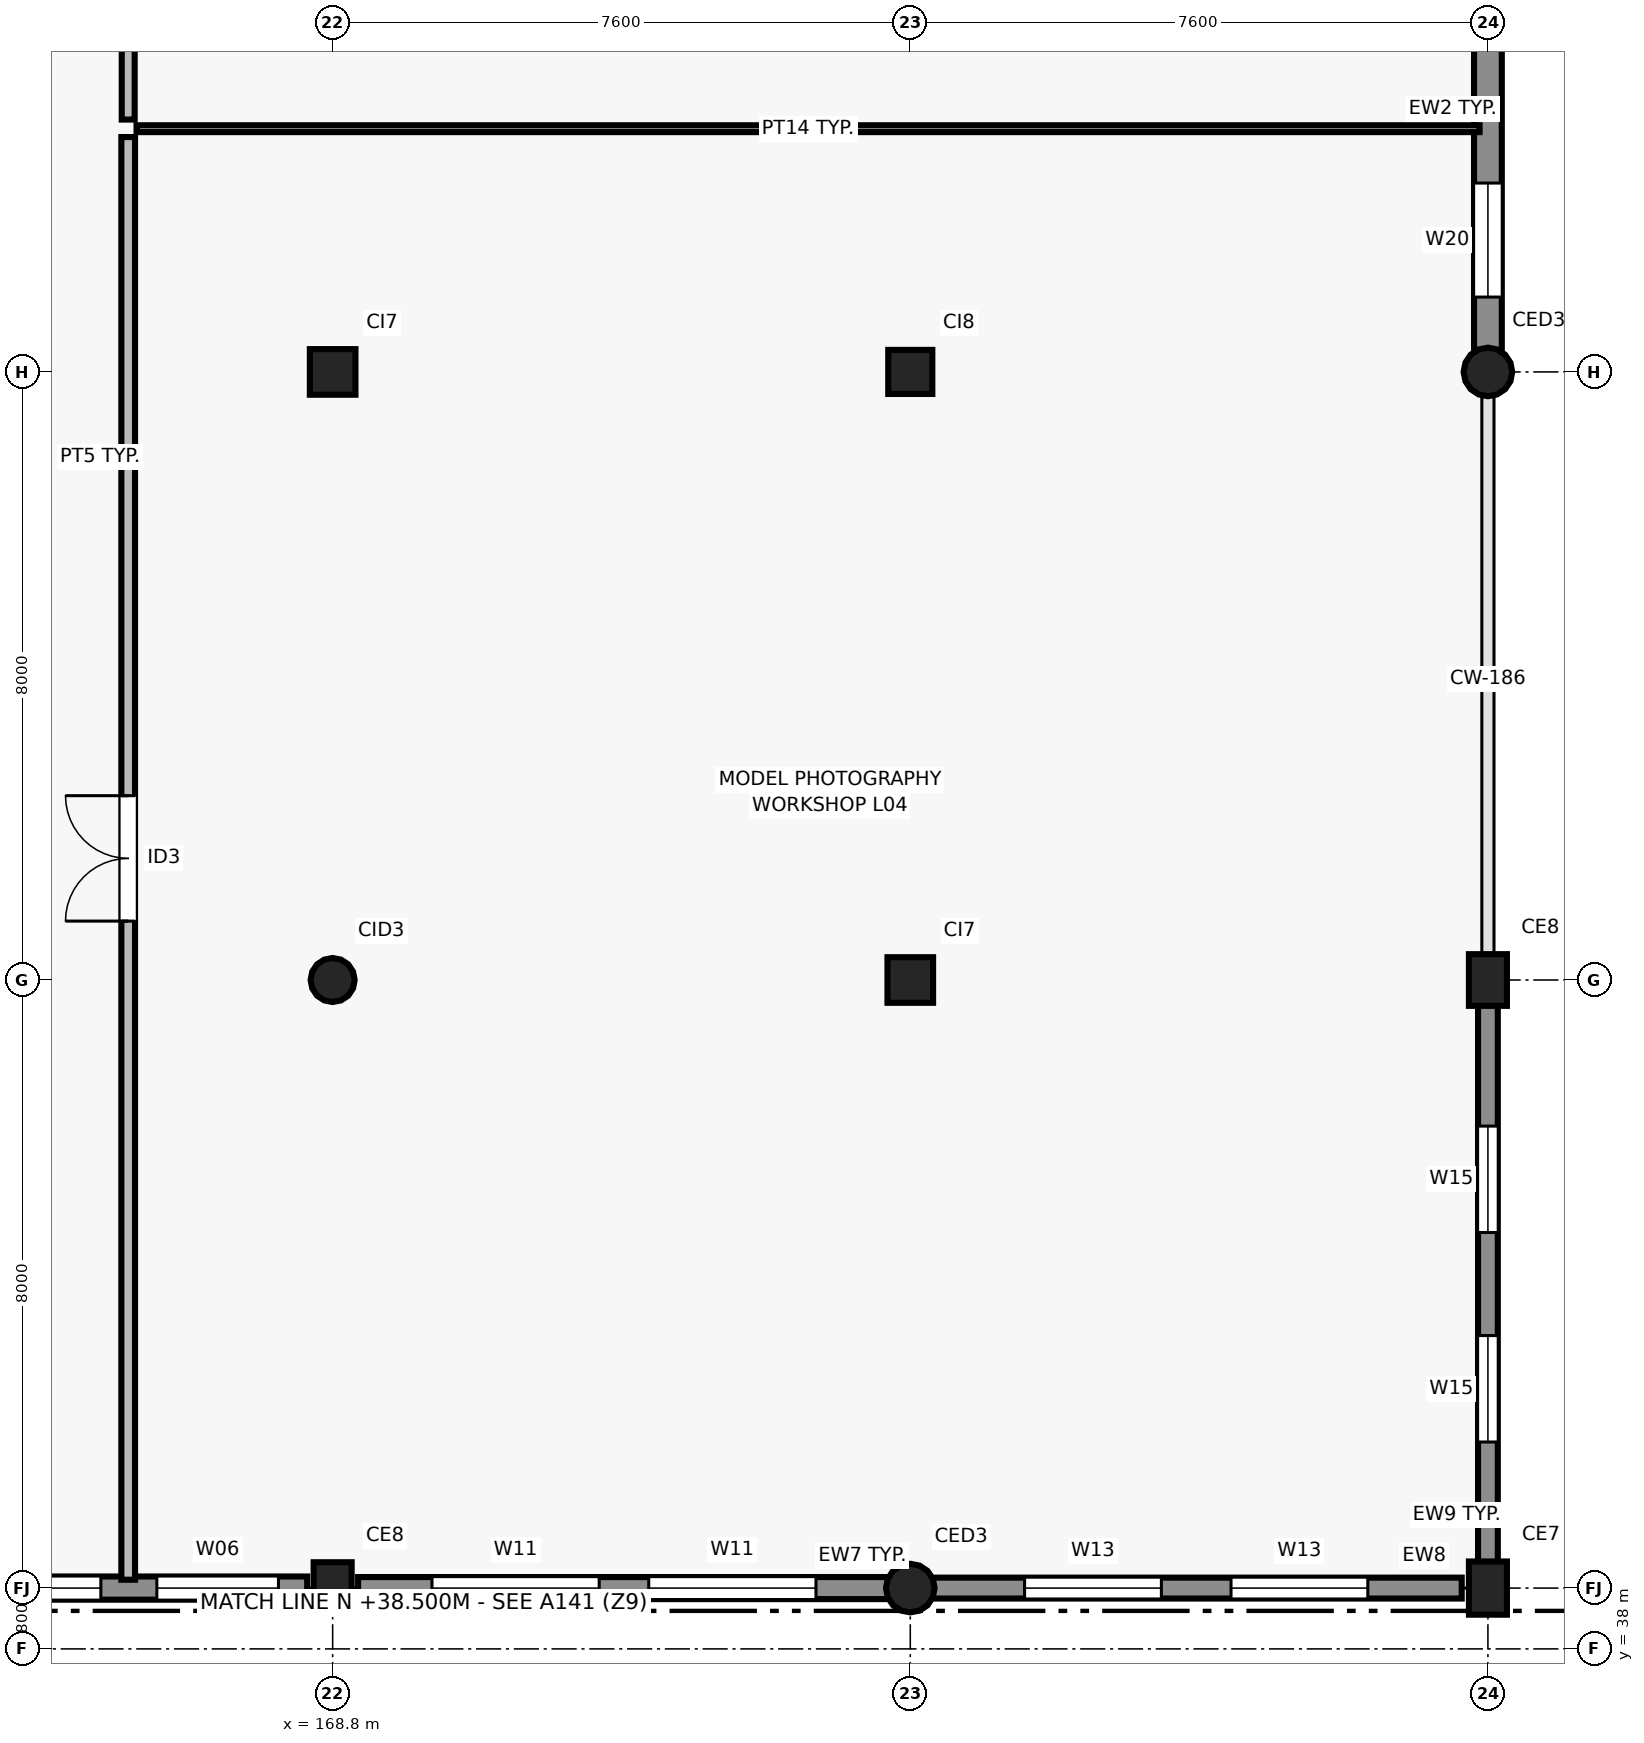
"""IFC4 building model, lengths in metres.
Left out: names, types, materials, properties, quantities, classifications, styles, units other than length and angle.
Written with IfcOpenShell. Run it as: python <this file> out.ifc"""

import sys

from ifc_helpers import new_model, si_unit, direction, frame, frame_2d, origin, origin_2d, place, context, subcontext, project, spatial, rectangle, circle, extrude, element, fill, save


model = new_model("IFC4")
c1 = context("Model", 3, precision=1e-05, world=origin(), true_north=direction((0.0, 1.0)))
c2 = subcontext(c1, "Body", "Model", "MODEL_VIEW")
j1 = project(units=[si_unit("LENGTHUNIT", "METRE"), si_unit("PLANEANGLEUNIT", "RADIAN")], contexts=[c1])
p1 = place(None, origin())
s1 = spatial("IfcSite", under=j1, at=p1, CompositionType="ELEMENT")
p2 = place(p1, origin())
s2 = spatial("IfcBuilding", under=s1, at=p2, CompositionType="ELEMENT")
p3 = place(p2, frame((0.0, 0.0, 17.4)))
s3 = spatial("IfcBuildingStorey", under=s2, at=p3, CompositionType="ELEMENT", Elevation=17.4)
p4 = place(p3, frame((168.8, 38.8, 0.0), z_axis=(0.0, 0.0, 1.0), x_axis=(1.0, 0.0, 0.0)))
e1 = element("IfcColumn", 1, at=p4, inside=s3, PredefinedType="COLUMN", context=c2, shape_type="SweptSolid", body=[
    extrude(rectangle(XDim=0.68, YDim=0.5, at=origin_2d()), origin(), (0.0, 0.0, 1.0), 4.2),
])
p5 = place(p3, frame((168.8, 46.8, 0.0), z_axis=(0.0, 0.0, 1.0), x_axis=(1.0, 0.0, 0.0)))
e2 = element("IfcColumn", 2, at=p5, inside=s3, PredefinedType="COLUMN", context=c2, shape_type="SweptSolid", body=[
    extrude(circle(Radius=0.29, at=origin_2d()), origin(), (0.0, 0.0, 1.0), 4.2),
])
p6 = place(p3, frame((168.8, 54.8, 0.0), z_axis=(0.0, 0.0, 1.0), x_axis=(1.0, 0.0, 0.0)))
e3 = element("IfcColumn", 3, at=p6, inside=s3, PredefinedType="COLUMN", context=c2, shape_type="SweptSolid", body=[
    extrude(rectangle(XDim=0.6, YDim=0.6, at=origin_2d()), origin(), (0.0, 0.0, 1.0), 4.2),
])
p7 = place(p3, frame((176.4, 38.8, 0.0), z_axis=(0.0, 0.0, 1.0), x_axis=(1.0, 0.0, 0.0)))
e4 = element("IfcColumn", 4, at=p7, inside=s3, PredefinedType="COLUMN", context=c2, shape_type="SweptSolid", body=[
    extrude(circle(Radius=0.32, at=origin_2d()), origin(), (0.0, 0.0, 1.0), 4.2),
])
p8 = place(p3, frame((176.4, 46.8, 0.0), z_axis=(0.0, 0.0, 1.0), x_axis=(1.0, 0.0, 0.0)))
e5 = element("IfcColumn", 5, at=p8, inside=s3, PredefinedType="COLUMN", context=c2, shape_type="SweptSolid", body=[
    extrude(rectangle(XDim=0.6, YDim=0.6, at=origin_2d()), origin(), (0.0, 0.0, 1.0), 4.2),
])
p9 = place(p3, frame((176.4, 54.8, 0.0), z_axis=(0.0, 0.0, 1.0), x_axis=(1.0, 0.0, 0.0)))
e6 = element("IfcColumn", 6, at=p9, inside=s3, PredefinedType="COLUMN", context=c2, shape_type="SweptSolid", body=[
    extrude(rectangle(XDim=0.58, YDim=0.58, at=origin_2d()), origin(), (0.0, 0.0, 1.0), 4.2),
])
p10 = place(p3, frame((184.0, 38.8, 0.0), z_axis=(0.0, 0.0, 1.0), x_axis=(1.0, 0.0, 0.0)))
e7 = element("IfcColumn", 7, at=p10, inside=s3, PredefinedType="COLUMN", context=c2, shape_type="SweptSolid", body=[
    extrude(rectangle(XDim=0.7, YDim=0.5, at=origin_2d()), origin(), (0.0, 0.0, 1.0), 4.2),
])
p11 = place(p3, frame((184.0, 46.8, 0.0), z_axis=(0.0, 0.0, 1.0), x_axis=(1.0, 0.0, 0.0)))
e8 = element("IfcColumn", 8, at=p11, inside=s3, PredefinedType="COLUMN", context=c2, shape_type="SweptSolid", body=[
    extrude(rectangle(XDim=0.68, YDim=0.5, at=origin_2d()), origin(), (0.0, 0.0, 1.0), 4.2),
])
p12 = place(p3, frame((184.0, 54.8, 0.0), z_axis=(0.0, 0.0, 1.0), x_axis=(1.0, 0.0, 0.0)))
e9 = element("IfcColumn", 9, at=p12, inside=s3, PredefinedType="COLUMN", context=c2, shape_type="SweptSolid", body=[
    extrude(circle(Radius=0.32, at=origin_2d()), origin(), (0.0, 0.0, 1.0), 4.2),
])
p13 = place(p3, frame((161.145, 38.8, 0.0), z_axis=(0.0, 0.0, 1.0), x_axis=(1.0, 0.0, 0.0)))
e10 = element("IfcWall", 10, at=p13, inside=s3, PredefinedType="SOLIDWALL", context=c2, shape_type="SweptSolid", body=[
    extrude(rectangle(XDim=7.32, YDim=0.305, at=frame_2d((3.66, 0.0))), origin(), (0.0, 0.0, 1.0), 3.37),
])
p14 = place(p13, frame((0.422, 0.0, 0.9)))
e11 = element("IfcOpeningElement", 11, at=p14, cuts=e10, PredefinedType="OPENING", context=c2, shape_type="SweptSolid", body=[
    extrude(rectangle(XDim=1.2, YDim=1.8, at=frame_2d((0.6, 0.9))), frame((0.0, 0.162, 0.0), z_axis=(0.0, -1.0, 0.0), x_axis=(1.0, 0.0, 0.0)), (0.0, 0.0, 1.0), 0.325),
])
p15 = place(p13, frame((2.405, 0.0, 0.9)))
e12 = element("IfcOpeningElement", 12, at=p15, cuts=e10, PredefinedType="OPENING", context=c2, shape_type="SweptSolid", body=[
    extrude(rectangle(XDim=2.2, YDim=1.5, at=frame_2d((1.1, 0.75))), frame((0.0, 0.162, 0.0), z_axis=(0.0, -1.0, 0.0), x_axis=(1.0, 0.0, 0.0)), (0.0, 0.0, 1.0), 0.325),
])
p16 = place(p13, frame((5.342, 0.0, 0.9)))
e13 = element("IfcOpeningElement", 13, at=p16, cuts=e10, PredefinedType="OPENING", context=c2, shape_type="SweptSolid", body=[
    extrude(rectangle(XDim=1.6, YDim=1.8, at=frame_2d((0.8, 0.9))), frame((0.0, 0.162, 0.0), z_axis=(0.0, -1.0, 0.0), x_axis=(1.0, 0.0, 0.0)), (0.0, 0.0, 1.0), 0.325),
])
p17 = place(p3, frame((169.135, 38.8, 0.0), z_axis=(0.0, 0.0, 1.0), x_axis=(1.0, 0.0, 0.0)))
e14 = element("IfcWall", 14, at=p17, inside=s3, PredefinedType="SOLIDWALL", context=c2, shape_type="SweptSolid", body=[
    extrude(rectangle(XDim=6.996, YDim=0.29, at=frame_2d((3.498, 0.0))), origin(), (0.0, 0.0, 1.0), 3.42),
])
p18 = place(p17, frame((0.972, 0.0, 0.9)))
e15 = element("IfcOpeningElement", 15, at=p18, cuts=e14, PredefinedType="OPENING", context=c2, shape_type="SweptSolid", body=[
    extrude(rectangle(XDim=2.2, YDim=1.5, at=frame_2d((1.1, 0.75))), frame((0.0, 0.155, 0.0), z_axis=(0.0, -1.0, 0.0), x_axis=(1.0, 0.0, 0.0)), (0.0, 0.0, 1.0), 0.31),
])
p19 = place(p17, frame((3.824, 0.0, 0.9)))
e16 = element("IfcOpeningElement", 16, at=p19, cuts=e14, PredefinedType="OPENING", context=c2, shape_type="SweptSolid", body=[
    extrude(rectangle(XDim=2.2, YDim=1.5, at=frame_2d((1.1, 0.75))), frame((0.0, 0.155, 0.0), z_axis=(0.0, -1.0, 0.0), x_axis=(1.0, 0.0, 0.0)), (0.0, 0.0, 1.0), 0.31),
])
p20 = place(p3, frame((176.669, 38.8, 0.0), z_axis=(0.0, 0.0, 1.0), x_axis=(1.0, 0.0, 0.0)))
e17 = element("IfcWall", 17, at=p20, inside=s3, PredefinedType="SOLIDWALL", context=c2, shape_type="SweptSolid", body=[
    extrude(rectangle(XDim=6.986, YDim=0.275, at=frame_2d((3.493, 0.0))), origin(), (0.0, 0.0, 1.0), 3.37),
])
p21 = place(p20, frame((1.235, 0.0, 0.9)))
e18 = element("IfcOpeningElement", 18, at=p21, cuts=e17, PredefinedType="OPENING", context=c2, shape_type="SweptSolid", body=[
    extrude(rectangle(XDim=1.8, YDim=1.5, at=frame_2d((0.9, 0.75))), frame((0.0, 0.147, 0.0), z_axis=(0.0, -1.0, 0.0), x_axis=(1.0, 0.0, 0.0)), (0.0, 0.0, 1.0), 0.295),
])
p22 = place(p20, frame((3.951, 0.0, 0.9)))
e19 = element("IfcOpeningElement", 19, at=p22, cuts=e17, PredefinedType="OPENING", context=c2, shape_type="SweptSolid", body=[
    extrude(rectangle(XDim=1.8, YDim=1.5, at=frame_2d((0.9, 0.75))), frame((0.0, 0.147, 0.0), z_axis=(0.0, -1.0, 0.0), x_axis=(1.0, 0.0, 0.0)), (0.0, 0.0, 1.0), 0.295),
])
p23 = place(p3, frame((184.0, 39.045, 0.0), z_axis=(0.0, 0.0, 1.0), x_axis=(0.0, 1.0, 0.0)))
e20 = element("IfcWall", 20, at=p23, inside=s3, PredefinedType="SOLIDWALL", context=c2, shape_type="SweptSolid", body=[
    extrude(rectangle(XDim=7.51, YDim=0.26, at=frame_2d((3.755, 0.0))), origin(), (0.0, 0.0, 1.0), 3.45),
])
p24 = place(p23, frame((1.677, 0.0, 0.9)))
e21 = element("IfcOpeningElement", 21, at=p24, cuts=e20, PredefinedType="OPENING", context=c2, shape_type="SweptSolid", body=[
    extrude(rectangle(XDim=1.4, YDim=1.5, at=frame_2d((0.7, 0.75))), frame((0.0, 0.14, 0.0), z_axis=(0.0, -1.0, 0.0), x_axis=(1.0, 0.0, 0.0)), (0.0, 0.0, 1.0), 0.28),
])
p25 = place(p23, frame((4.433, 0.0, 0.9)))
e22 = element("IfcOpeningElement", 22, at=p25, cuts=e20, PredefinedType="OPENING", context=c2, shape_type="SweptSolid", body=[
    extrude(rectangle(XDim=1.4, YDim=1.5, at=frame_2d((0.7, 0.75))), frame((0.0, 0.14, 0.0), z_axis=(0.0, -1.0, 0.0), x_axis=(1.0, 0.0, 0.0)), (0.0, 0.0, 1.0), 0.28),
])
p26 = place(p3, frame((184.0, 55.069, 0.0), z_axis=(0.0, 0.0, 1.0), x_axis=(0.0, 1.0, 0.0)))
e23 = element("IfcWall", 23, at=p26, inside=s3, PredefinedType="SOLIDWALL", context=c2, shape_type="SweptSolid", body=[
    extrude(rectangle(XDim=7.486, YDim=0.365, at=frame_2d((3.743, 0.0))), origin(), (0.0, 0.0, 1.0), 3.53),
])
p27 = place(p26, frame((0.716, 0.0, 0.9)))
e24 = element("IfcOpeningElement", 24, at=p27, cuts=e23, PredefinedType="OPENING", context=c2, shape_type="SweptSolid", body=[
    extrude(rectangle(XDim=1.5, YDim=1.25, at=frame_2d((0.75, 0.625))), frame((0.0, 0.192, 0.0), z_axis=(0.0, -1.0, 0.0), x_axis=(1.0, 0.0, 0.0)), (0.0, 0.0, 1.0), 0.385),
])
p28 = place(p26, frame((4.159, 0.0, 0.9)))
e25 = element("IfcOpeningElement", 25, at=p28, cuts=e23, PredefinedType="OPENING", context=c2, shape_type="SweptSolid", body=[
    extrude(rectangle(XDim=2.1, YDim=1.25, at=frame_2d((1.05, 0.625))), frame((0.0, 0.192, 0.0), z_axis=(0.0, -1.0, 0.0), x_axis=(1.0, 0.0, 0.0)), (0.0, 0.0, 1.0), 0.385),
])
p29 = place(p3, frame((166.22, 58.0, 0.0), z_axis=(0.0, 0.0, 1.0), x_axis=(1.0, 0.0, 0.0)))
e26 = element("IfcWall", 26, at=p29, inside=s3, PredefinedType="PARTITIONING", context=c2, shape_type="SweptSolid", body=[
    extrude(rectangle(XDim=17.67, YDim=0.09, at=frame_2d((8.835, 0.0))), origin(), (0.0, 0.0, 1.0), 3.9),
])
p30 = place(p3, frame((166.11, 38.91, 0.0), z_axis=(0.0, 0.0, 1.0), x_axis=(0.0, 1.0, 0.0)))
e27 = element("IfcWall", 27, at=p30, inside=s3, PredefinedType="PARTITIONING", context=c2, shape_type="SweptSolid", body=[
    extrude(rectangle(XDim=18.98, YDim=0.18, at=frame_2d((9.49, 0.0))), origin(), (0.0, 0.0, 1.0), 3.9),
])
p31 = place(p30, frame((8.665, 0.0, 0.0)))
e28 = element("IfcOpeningElement", 28, at=p31, cuts=e27, PredefinedType="OPENING", context=c2, shape_type="SweptSolid", body=[
    extrude(rectangle(XDim=1.65, YDim=2.3, at=frame_2d((0.825, 1.15))), frame((0.0, 0.1, 0.0), z_axis=(0.0, -1.0, 0.0), x_axis=(1.0, 0.0, 0.0)), (0.0, 0.0, 1.0), 0.2),
])
p32 = place(p3, frame((166.11, 58.12, 0.0), z_axis=(0.0, 0.0, 1.0), x_axis=(0.0, 1.0, 0.0)))
e29 = element("IfcWall", 29, at=p32, inside=s3, PredefinedType="PARTITIONING", context=c2, shape_type="SweptSolid", body=[
    extrude(rectangle(XDim=17.41, YDim=0.17, at=frame_2d((8.705, 0.0))), origin(), (0.0, 0.0, 1.0), 3.9),
])
p33 = place(p32, frame((8.225, 0.0, 0.0)))
e30 = element("IfcOpeningElement", 30, at=p33, cuts=e29, PredefinedType="OPENING", context=c2, shape_type="SweptSolid", body=[
    extrude(rectangle(XDim=0.96, YDim=2.15, at=frame_2d((0.48, 1.075))), frame((0.0, 0.095, 0.0), z_axis=(0.0, -1.0, 0.0), x_axis=(1.0, 0.0, 0.0)), (0.0, 0.0, 1.0), 0.19),
])
p34 = place(p15, origin())
e31 = element("IfcWindow", 31, at=p34, inside=s3, PartitioningType="SINGLE_PANEL", PredefinedType="WINDOW", context=c2, shape_type="SweptSolid", body=[
    extrude(rectangle(XDim=2.2, YDim=1.5, at=frame_2d((1.1, 0.75))), frame((0.0, 0.03, 0.0), z_axis=(0.0, -1.0, 0.0), x_axis=(1.0, 0.0, 0.0)), (0.0, 0.0, 1.0), 0.06),
])
fill(e12, e31)
p35 = place(p16, origin())
e32 = element("IfcWindow", 32, at=p35, inside=s3, PartitioningType="SINGLE_PANEL", PredefinedType="WINDOW", context=c2, shape_type="SweptSolid", body=[
    extrude(rectangle(XDim=1.6, YDim=1.8, at=frame_2d((0.8, 0.9))), frame((0.0, 0.03, 0.0), z_axis=(0.0, -1.0, 0.0), x_axis=(1.0, 0.0, 0.0)), (0.0, 0.0, 1.0), 0.06),
])
fill(e13, e32)
p36 = place(p18, origin())
e33 = element("IfcWindow", 33, at=p36, inside=s3, PartitioningType="SINGLE_PANEL", PredefinedType="WINDOW", context=c2, shape_type="SweptSolid", body=[
    extrude(rectangle(XDim=2.2, YDim=1.5, at=frame_2d((1.1, 0.75))), frame((0.0, 0.03, 0.0), z_axis=(0.0, -1.0, 0.0), x_axis=(1.0, 0.0, 0.0)), (0.0, 0.0, 1.0), 0.06),
])
fill(e15, e33)
p37 = place(p19, origin())
e34 = element("IfcWindow", 34, at=p37, inside=s3, PartitioningType="SINGLE_PANEL", PredefinedType="WINDOW", context=c2, shape_type="SweptSolid", body=[
    extrude(rectangle(XDim=2.2, YDim=1.5, at=frame_2d((1.1, 0.75))), frame((0.0, 0.03, 0.0), z_axis=(0.0, -1.0, 0.0), x_axis=(1.0, 0.0, 0.0)), (0.0, 0.0, 1.0), 0.06),
])
fill(e16, e34)
p38 = place(p21, origin())
e35 = element("IfcWindow", 35, at=p38, inside=s3, PartitioningType="SINGLE_PANEL", PredefinedType="WINDOW", context=c2, shape_type="SweptSolid", body=[
    extrude(rectangle(XDim=1.8, YDim=1.5, at=frame_2d((0.9, 0.75))), frame((0.0, 0.03, 0.0), z_axis=(0.0, -1.0, 0.0), x_axis=(1.0, 0.0, 0.0)), (0.0, 0.0, 1.0), 0.06),
])
fill(e18, e35)
p39 = place(p22, origin())
e36 = element("IfcWindow", 36, at=p39, inside=s3, PartitioningType="SINGLE_PANEL", PredefinedType="WINDOW", context=c2, shape_type="SweptSolid", body=[
    extrude(rectangle(XDim=1.8, YDim=1.5, at=frame_2d((0.9, 0.75))), frame((0.0, 0.03, 0.0), z_axis=(0.0, -1.0, 0.0), x_axis=(1.0, 0.0, 0.0)), (0.0, 0.0, 1.0), 0.06),
])
fill(e19, e36)
p40 = place(p24, origin())
e37 = element("IfcWindow", 37, at=p40, inside=s3, PartitioningType="SINGLE_PANEL", PredefinedType="WINDOW", context=c2, shape_type="SweptSolid", body=[
    extrude(rectangle(XDim=1.4, YDim=1.5, at=frame_2d((0.7, 0.75))), frame((0.0, 0.03, 0.0), z_axis=(0.0, -1.0, 0.0), x_axis=(1.0, 0.0, 0.0)), (0.0, 0.0, 1.0), 0.06),
])
fill(e21, e37)
p41 = place(p25, origin())
e38 = element("IfcWindow", 38, at=p41, inside=s3, PartitioningType="SINGLE_PANEL", PredefinedType="WINDOW", context=c2, shape_type="SweptSolid", body=[
    extrude(rectangle(XDim=1.4, YDim=1.5, at=frame_2d((0.7, 0.75))), frame((0.0, 0.03, 0.0), z_axis=(0.0, -1.0, 0.0), x_axis=(1.0, 0.0, 0.0)), (0.0, 0.0, 1.0), 0.06),
])
fill(e22, e38)
p42 = place(p27, origin())
e39 = element("IfcWindow", 39, at=p42, inside=s3, PartitioningType="SINGLE_PANEL", PredefinedType="WINDOW", context=c2, shape_type="SweptSolid", body=[
    extrude(rectangle(XDim=1.5, YDim=1.25, at=frame_2d((0.75, 0.625))), frame((0.0, 0.03, 0.0), z_axis=(0.0, -1.0, 0.0), x_axis=(1.0, 0.0, 0.0)), (0.0, 0.0, 1.0), 0.06),
])
fill(e24, e39)
p43 = place(p31, origin())
e40 = element("IfcDoor", 40, at=p43, inside=s3, OperationType="DOUBLE_DOOR_SINGLE_SWING", PredefinedType="DOOR", context=c2, shape_type="SweptSolid", body=[
    extrude(rectangle(XDim=1.65, YDim=2.3, at=frame_2d((0.825, 1.15))), frame((0.0, 0.025, 0.0), z_axis=(0.0, -1.0, 0.0), x_axis=(1.0, 0.0, 0.0)), (0.0, 0.0, 1.0), 0.05),
])
fill(e28, e40)
save(model, sys.argv[1])
